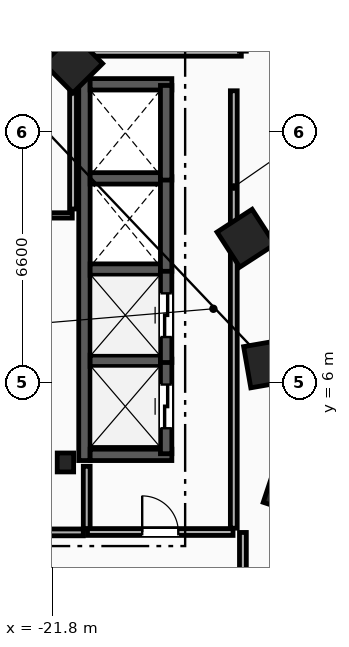
"""IFC4 building model, lengths in metres.
Left out: names, types, materials, properties, quantities, classifications, styles, units other than length and angle.
Written with IfcOpenShell. Run it as: python <this file> out.ifc"""

import sys

from ifc_helpers import new_model, si_unit, direction, frame, frame_2d, origin, origin_2d, place, context, subcontext, project, spatial, rectangle, i_section, extrude, element, fill, save


model = new_model("IFC4")
c1 = context("Model", 3, precision=1e-05, world=origin(), true_north=direction((0.0, 1.0)))
c2 = subcontext(c1, "Body", "Model", "MODEL_VIEW")
j1 = project(units=[si_unit("LENGTHUNIT", "METRE"), si_unit("PLANEANGLEUNIT", "RADIAN")], contexts=[c1])
p1 = place(None, origin())
s1 = spatial("IfcSite", under=j1, at=p1, CompositionType="ELEMENT")
p2 = place(p1, origin())
s2 = spatial("IfcBuilding", under=s1, at=p2, CompositionType="ELEMENT")
p3 = place(p2, frame((0.0, 0.0, 128.6)))
s3 = spatial("IfcBuildingStorey", under=s2, at=p3, CompositionType="ELEMENT", Elevation=128.6)
p4 = place(p3, frame((-21.45, 3.9, 0.0), z_axis=(0.0, 0.0, 1.0), x_axis=(1.0, 0.0, 0.0)))
e1 = element("IfcColumn", 1, at=p4, inside=s3, PredefinedType="COLUMN", context=c2, shape_type="SweptSolid", body=[
    extrude(i_section(OverallWidth=0.432, OverallDepth=0.498, WebThickness=0.056, FlangeThickness=0.089, FilletRadius=0.018, at=origin_2d()), origin(), (0.0, 0.0, 1.0), 3.6),
])
for number, where, z_axis, x_axis in (
    (2, (-15.55, 3.2, 0.0), (0.0, 0.0, 1.0), (0.315, 0.949, 0.0)),
    (3, (-16.125, 6.5, 0.0), (0.0, 0.0, 1.0), (-0.172, 0.985, 0.0)),
    (4, (-16.7, 9.8, 0.0), (0.0, 0.0, 1.0), (-0.544, 0.839, 0.0)),
    (5, (-21.25, 14.4, 0.0), (0.0, 0.0, 1.0), (-0.703, 0.711, 0.0)),
):
    element("IfcColumn", number, at=place(p3, frame(where, z_axis=z_axis, x_axis=x_axis)), inside=s3, PredefinedType="COLUMN", context=c2, shape_type="SweptSolid", body=[
        extrude(rectangle(XDim=1.1, YDim=1.1, at=origin_2d()), origin(), (0.0, 0.0, 1.0), 3.6),
    ])
p5 = place(p3, frame((-20.89, 2.15, 0.0), z_axis=(0.0, 0.0, 1.0), x_axis=(0.0, 1.0, 0.0)))
e6 = element("IfcWall", 6, at=p5, inside=s3, PredefinedType="PARTITIONING", context=c2, shape_type="SweptSolid", body=[
    extrude(rectangle(XDim=1.65, YDim=0.18, at=frame_2d((0.825, 0.0))), origin(), (0.0, 0.0, 1.0), 3.32),
])
p6 = place(p3, frame((-23.98, 2.06, 0.0), z_axis=(0.0, 0.0, 1.0), x_axis=(1.0, 0.0, 0.0)))
e7 = element("IfcWall", 7, at=p6, inside=s3, PredefinedType="PARTITIONING", context=c2, shape_type="SweptSolid", body=[
    extrude(rectangle(XDim=3.0, YDim=0.18, at=frame_2d((1.5, 0.0))), origin(), (0.0, 0.0, 1.0), 3.32),
])
p7 = place(p6, frame((0.9, 0.0, 0.0)))
e8 = element("IfcOpeningElement", 8, at=p7, cuts=e7, PredefinedType="OPENING", context=c2, shape_type="SweptSolid", body=[
    extrude(rectangle(XDim=1.2, YDim=2.15, at=frame_2d((0.6, 1.075))), frame((0.0, 0.1, 0.0), z_axis=(0.0, -1.0, 0.0), x_axis=(1.0, 0.0, 0.0)), (0.0, 0.0, 1.0), 0.2),
])
p8 = place(p3, frame((-20.95, 3.95, 0.0), z_axis=(0.0, 0.0, 1.0), x_axis=(0.0, 1.0, 0.0)))
e9 = element("IfcWall", 9, at=p8, inside=s3, PredefinedType="SHEAR", context=c2, shape_type="SweptSolid", body=[
    extrude(rectangle(XDim=10.05, YDim=0.3, at=frame_2d((5.025, 0.0))), origin(), (0.0, 0.0, 1.0), 3.32),
])
for number, where, z_axis, x_axis in (
    (10, (-20.8, 4.1, 0.0), (0.0, 0.0, 1.0), (1.0, 0.0, 0.0)),
    (11, (-20.8, 13.85, 0.0), (0.0, 0.0, 1.0), (1.0, 0.0, 0.0)),
):
    element("IfcWall", number, at=place(p3, frame(where, z_axis=z_axis, x_axis=x_axis)), inside=s3, PredefinedType="SHEAR", context=c2, shape_type="SweptSolid", body=[
        extrude(rectangle(XDim=2.15, YDim=0.3, at=frame_2d((1.075, 0.0))), origin(), (0.0, 0.0, 1.0), 3.32),
    ])
for number, where, z_axis, x_axis in (
    (12, (-20.8, 6.575, 0.0), (0.0, 0.0, 1.0), (1.0, 0.0, 0.0)),
    (13, (-20.8, 8.975, 0.0), (0.0, 0.0, 1.0), (1.0, 0.0, 0.0)),
    (14, (-20.8, 11.375, 0.0), (0.0, 0.0, 1.0), (1.0, 0.0, 0.0)),
):
    element("IfcWall", number, at=place(p3, frame(where, z_axis=z_axis, x_axis=x_axis)), inside=s3, PredefinedType="SHEAR", context=c2, shape_type="SweptSolid", body=[
        extrude(rectangle(XDim=1.85, YDim=0.3, at=frame_2d((0.925, 0.0))), origin(), (0.0, 0.0, 1.0), 3.32),
    ])
p9 = place(p3, frame((-18.8, 4.13, 0.0), z_axis=(0.0, 0.0, 1.0), x_axis=(0.0, 1.0, 0.0)))
e15 = element("IfcWall", 15, at=p9, inside=s3, PredefinedType="SHEAR", context=c2, shape_type="SweptSolid", body=[
    extrude(rectangle(XDim=2.49, YDim=0.3, at=frame_2d((1.245, 0.0))), origin(), (0.0, 0.0, 1.0), 3.32),
])
p10 = place(p9, frame((0.67, 0.0, 0.0)))
e16 = element("IfcOpeningElement", 16, at=p10, cuts=e15, PredefinedType="OPENING", context=c2, shape_type="SweptSolid", body=[
    extrude(rectangle(XDim=1.15, YDim=2.2, at=frame_2d((0.575, 1.1))), frame((0.0, 0.16, 0.0), z_axis=(0.0, -1.0, 0.0), x_axis=(1.0, 0.0, 0.0)), (0.0, 0.0, 1.0), 0.32),
])
p11 = place(p3, frame((-18.8, 6.53, 0.0), z_axis=(0.0, 0.0, 1.0), x_axis=(0.0, 1.0, 0.0)))
e17 = element("IfcWall", 17, at=p11, inside=s3, PredefinedType="SHEAR", context=c2, shape_type="SweptSolid", body=[
    extrude(rectangle(XDim=2.49, YDim=0.3, at=frame_2d((1.245, 0.0))), origin(), (0.0, 0.0, 1.0), 3.32),
])
p12 = place(p11, frame((0.67, 0.0, 0.0)))
e18 = element("IfcOpeningElement", 18, at=p12, cuts=e17, PredefinedType="OPENING", context=c2, shape_type="SweptSolid", body=[
    extrude(rectangle(XDim=1.15, YDim=2.2, at=frame_2d((0.575, 1.1))), frame((0.0, 0.16, 0.0), z_axis=(0.0, -1.0, 0.0), x_axis=(1.0, 0.0, 0.0)), (0.0, 0.0, 1.0), 0.32),
])
for number, where, z_axis, x_axis in (
    (19, (-18.8, 8.93, 0.0), (0.0, 0.0, 1.0), (0.0, 1.0, 0.0)),
    (20, (-18.8, 11.33, 0.0), (0.0, 0.0, 1.0), (0.0, 1.0, 0.0)),
):
    element("IfcWall", number, at=place(p3, frame(where, z_axis=z_axis, x_axis=x_axis)), inside=s3, PredefinedType="SHEAR", context=c2, shape_type="SweptSolid", body=[
        extrude(rectangle(XDim=2.49, YDim=0.3, at=frame_2d((1.245, 0.0))), origin(), (0.0, 0.0, 1.0), 3.32),
    ])
p13 = place(p3, frame((-17.02, 2.17, 0.0), z_axis=(0.0, 0.0, 1.0), x_axis=(0.0, 1.0, 0.0)))
e21 = element("IfcWall", 21, at=p13, inside=s3, PredefinedType="PARTITIONING", context=c2, shape_type="SweptSolid", body=[
    extrude(rectangle(XDim=11.51, YDim=0.18, at=frame_2d((5.755, 0.0))), origin(), (0.0, 0.0, 1.0), 3.32),
])
p14 = place(p3, frame((-20.87, 2.07, 0.0), z_axis=(0.0, 0.0, 1.0), x_axis=(1.0, 0.0, 0.0)))
e22 = element("IfcWall", 22, at=p14, inside=s3, PredefinedType="PARTITIONING", context=c2, shape_type="SweptSolid", body=[
    extrude(rectangle(XDim=3.83, YDim=0.18, at=frame_2d((1.915, 0.0))), origin(), (0.0, 0.0, 1.0), 3.32),
])
p15 = place(p14, frame((1.44, 0.0, 0.0)))
e23 = element("IfcOpeningElement", 23, at=p15, cuts=e22, PredefinedType="OPENING", context=c2, shape_type="SweptSolid", body=[
    extrude(rectangle(XDim=0.95, YDim=2.1, at=frame_2d((0.475, 1.05))), frame((0.0, 0.1, 0.0), z_axis=(0.0, -1.0, 0.0), x_axis=(1.0, 0.0, 0.0)), (0.0, 0.0, 1.0), 0.2),
])
p16 = place(p3, frame((-21.86, 10.4, 0.0), z_axis=(0.0, 0.0, 1.0), x_axis=(1.0, 0.0, 0.0)))
e24 = element("IfcWall", 24, at=p16, inside=s3, PredefinedType="PARTITIONING", context=c2, shape_type="SweptSolid", body=[
    extrude(rectangle(XDim=0.59, YDim=0.14, at=frame_2d((0.295, 0.0))), origin(), (0.0, 0.0, 1.0), 3.32),
])
p17 = place(p3, frame((-21.25, 10.57, 0.0), z_axis=(0.0, 0.0, 1.0), x_axis=(0.0, 1.0, 0.0)))
e25 = element("IfcWall", 25, at=p17, inside=s3, PredefinedType="PARTITIONING", context=c2, shape_type="SweptSolid", body=[
    extrude(rectangle(XDim=4.36, YDim=0.18, at=frame_2d((2.18, 0.0))), origin(), (0.0, 0.0, 1.0), 3.32),
])
p18 = place(p3, frame((-21.178, 14.68, 0.0), z_axis=(0.0, 0.0, 1.0), x_axis=(1.0, 0.0, 0.0)))
e26 = element("IfcWall", 26, at=p18, inside=s3, PredefinedType="PARTITIONING", context=c2, shape_type="SweptSolid", body=[
    extrude(rectangle(XDim=4.357, YDim=0.18, at=frame_2d((2.178, 0.0))), origin(), (0.0, 0.0, 1.0), 3.32),
])
p19 = place(p3, frame((-16.78, -0.329, 0.0), z_axis=(0.0, 0.0, 1.0), x_axis=(0.0, 1.0, 0.0)))
e27 = element("IfcWall", 27, at=p19, inside=s3, PredefinedType="PARTITIONING", context=c2, shape_type="SweptSolid", body=[
    extrude(rectangle(XDim=2.387, YDim=0.18, at=frame_2d((1.194, 0.0))), origin(), (0.0, 0.0, 1.0), 3.32),
])
p20 = place(p10, origin())
e28 = element("IfcDoor", 28, at=p20, inside=s3, OperationType="SLIDING_TO_LEFT", PredefinedType="TRAPDOOR", context=c2, shape_type="SweptSolid", body=[
    extrude(rectangle(XDim=1.15, YDim=2.2, at=frame_2d((0.575, 1.1))), frame((0.0, 0.025, 0.0), z_axis=(0.0, -1.0, 0.0), x_axis=(1.0, 0.0, 0.0)), (0.0, 0.0, 1.0), 0.05),
])
fill(e16, e28)
p21 = place(p12, origin())
e29 = element("IfcDoor", 29, at=p21, inside=s3, OperationType="SLIDING_TO_LEFT", PredefinedType="TRAPDOOR", context=c2, shape_type="SweptSolid", body=[
    extrude(rectangle(XDim=1.15, YDim=2.2, at=frame_2d((0.575, 1.1))), frame((0.0, 0.025, 0.0), z_axis=(0.0, -1.0, 0.0), x_axis=(1.0, 0.0, 0.0)), (0.0, 0.0, 1.0), 0.05),
])
fill(e18, e29)
p22 = place(p15, origin())
e30 = element("IfcDoor", 30, at=p22, inside=s3, OperationType="SINGLE_SWING_LEFT", PredefinedType="DOOR", context=c2, shape_type="SweptSolid", body=[
    extrude(rectangle(XDim=0.95, YDim=2.1, at=frame_2d((0.475, 1.05))), frame((0.0, 0.025, 0.0), z_axis=(0.0, -1.0, 0.0), x_axis=(1.0, 0.0, 0.0)), (0.0, 0.0, 1.0), 0.05),
])
fill(e23, e30)
save(model, sys.argv[1])
